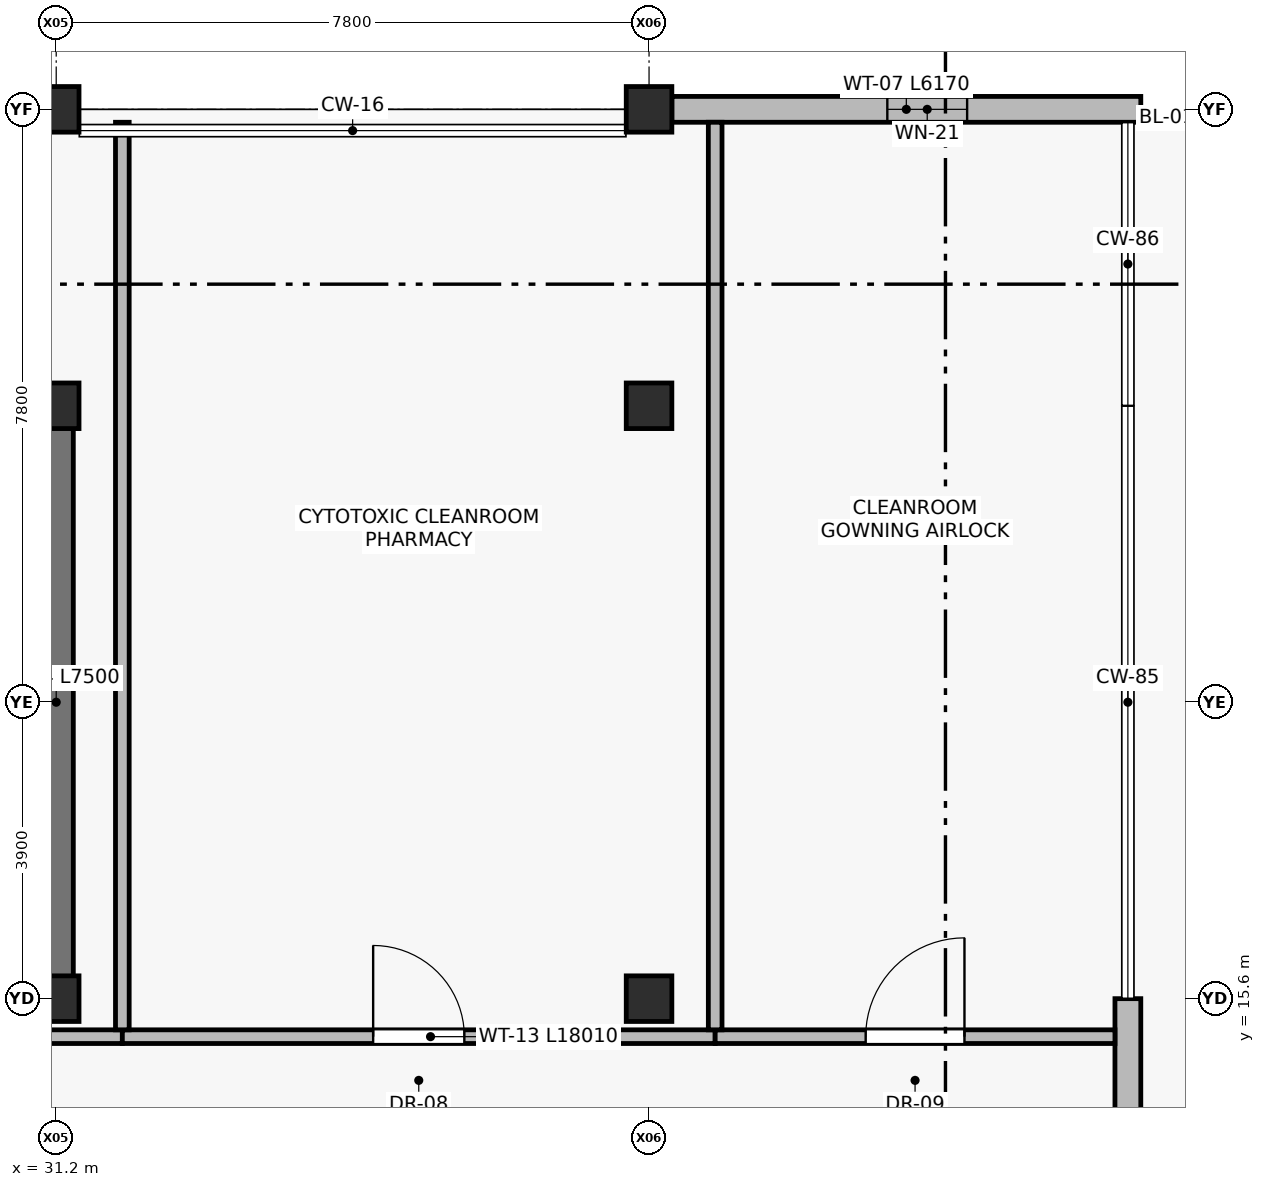
"""IFC4 building model, lengths in metres.
Left out: names, types, materials, properties, quantities, classifications, styles, units other than length and angle.
Written with IfcOpenShell. Run it as: python <this file> out.ifc"""

import sys

from ifc_helpers import new_model, si_unit, direction, frame, frame_2d, origin, origin_2d, place, context, subcontext, project, spatial, rectangle, extrude, element, fill, save


model = new_model("IFC4")
c1 = context("Model", 3, precision=1e-05, world=origin(), true_north=direction((0.0, 1.0)))
c2 = subcontext(c1, "Body", "Model", "MODEL_VIEW")
j1 = project(units=[si_unit("LENGTHUNIT", "METRE"), si_unit("PLANEANGLEUNIT", "RADIAN")], contexts=[c1])
p1 = place(None, origin())
s1 = spatial("IfcSite", under=j1, at=p1, CompositionType="ELEMENT")
p2 = place(p1, origin())
s2 = spatial("IfcBuilding", under=s1, at=p2, CompositionType="ELEMENT")
p3 = place(p2, frame((0.0, 0.0, 4.8)))
s3 = spatial("IfcBuildingStorey", under=s2, at=p3, CompositionType="ELEMENT", Elevation=4.8)
for number, where, z_axis, x_axis in (
    (1, (31.2, 15.6, 0.0), (0.0, 0.0, 1.0), (1.0, 0.0, 0.0)),
    (2, (31.2, 23.4, 0.0), (0.0, 0.0, 1.0), (1.0, 0.0, 0.0)),
    (3, (31.2, 27.3, 0.0), (0.0, 0.0, 1.0), (1.0, 0.0, 0.0)),
    (4, (39.0, 15.6, 0.0), (0.0, 0.0, 1.0), (1.0, 0.0, 0.0)),
    (5, (39.0, 23.4, 0.0), (0.0, 0.0, 1.0), (1.0, 0.0, 0.0)),
    (6, (39.0, 27.3, 0.0), (0.0, 0.0, 1.0), (1.0, 0.0, 0.0)),
):
    element("IfcColumn", number, at=place(p3, frame(where, z_axis=z_axis, x_axis=x_axis)), inside=s3, PredefinedType="COLUMN", context=c2, shape_type="SweptSolid", body=[
        extrude(rectangle(XDim=0.6, YDim=0.6, at=origin_2d()), origin(), (0.0, 0.0, 1.0), 4.8),
    ])
p4 = place(p3, frame((39.3, 27.3, 0.0), z_axis=(0.0, 0.0, 1.0), x_axis=(1.0, 0.0, 0.0)))
e7 = element("IfcWall", 7, at=p4, inside=s3, PredefinedType="STANDARD", context=c2, shape_type="SweptSolid", body=[
    extrude(rectangle(XDim=6.17, YDim=0.34, at=frame_2d((3.085, 0.0))), origin(), (0.0, 0.0, 1.0), 4.14),
])
p5 = place(p4, frame((2.835, 0.0, 0.9)))
e8 = element("IfcOpeningElement", 8, at=p5, cuts=e7, PredefinedType="OPENING", context=c2, shape_type="SweptSolid", body=[
    extrude(rectangle(XDim=1.05, YDim=1.65, at=frame_2d((0.525, 0.825))), frame((0.0, 0.18, 0.0), z_axis=(0.0, -1.0, 0.0), x_axis=(1.0, 0.0, 0.0)), (0.0, 0.0, 1.0), 0.36),
])
p6 = place(p3, frame((45.3, 15.6, 0.0), z_axis=(0.0, 0.0, 1.0), x_axis=(0.0, -1.0, 0.0)))
e9 = element("IfcWall", 9, at=p6, inside=s3, PredefinedType="STANDARD", context=c2, shape_type="SweptSolid", body=[
    extrude(rectangle(XDim=7.8, YDim=0.34, at=frame_2d((3.9, 0.0))), origin(), (0.0, 0.0, 1.0), 4.54),
])
p7 = place(p6, frame((1.475, 0.0, 0.0)))
e10 = element("IfcOpeningElement", 10, at=p7, cuts=e9, PredefinedType="OPENING", context=c2, shape_type="SweptSolid", body=[
    extrude(rectangle(XDim=1.25, YDim=2.2, at=frame_2d((0.625, 1.1))), frame((0.0, 0.18, 0.0), z_axis=(0.0, -1.0, 0.0), x_axis=(1.0, 0.0, 0.0)), (0.0, 0.0, 1.0), 0.36),
])
p8 = place(p3, frame((31.2, 15.75, 0.0), z_axis=(0.0, 0.0, 1.0), x_axis=(0.0, 1.0, 0.0)))
e11 = element("IfcWall", 11, at=p8, inside=s3, PredefinedType="SHEAR", context=c2, shape_type="SweptSolid", body=[
    extrude(rectangle(XDim=7.5, YDim=0.45, at=frame_2d((3.75, 0.0))), origin(), (0.0, 0.0, 1.0), 4.54),
])
p9 = place(p3, frame((27.12, 15.1, 0.0), z_axis=(0.0, 0.0, 1.0), x_axis=(1.0, 0.0, 0.0)))
e12 = element("IfcWall", 12, at=p9, inside=s3, PredefinedType="PARTITIONING", context=c2, shape_type="SweptSolid", body=[
    extrude(rectangle(XDim=4.95, YDim=0.18, at=frame_2d((2.475, 0.0))), origin(), (0.0, 0.0, 1.0), 4.54),
])
p10 = place(p9, frame((1.9, 0.0, 0.0)))
e13 = element("IfcOpeningElement", 13, at=p10, cuts=e12, PredefinedType="OPENING", context=c2, shape_type="SweptSolid", body=[
    extrude(rectangle(XDim=1.15, YDim=2.2, at=frame_2d((0.575, 1.1))), frame((0.0, 0.1, 0.0), z_axis=(0.0, -1.0, 0.0), x_axis=(1.0, 0.0, 0.0)), (0.0, 0.0, 1.0), 0.2),
])
p11 = place(p3, frame((32.07, 15.1, 0.0), z_axis=(0.0, 0.0, 1.0), x_axis=(1.0, 0.0, 0.0)))
e14 = element("IfcWall", 14, at=p11, inside=s3, PredefinedType="PARTITIONING", context=c2, shape_type="SweptSolid", body=[
    extrude(rectangle(XDim=7.8, YDim=0.18, at=frame_2d((3.9, 0.0))), origin(), (0.0, 0.0, 1.0), 4.54),
])
p12 = place(p11, frame((3.3, 0.0, 0.0)))
e15 = element("IfcOpeningElement", 15, at=p12, cuts=e14, PredefinedType="OPENING", context=c2, shape_type="SweptSolid", body=[
    extrude(rectangle(XDim=1.2, YDim=2.2, at=frame_2d((0.6, 1.1))), frame((0.0, 0.1, 0.0), z_axis=(0.0, -1.0, 0.0), x_axis=(1.0, 0.0, 0.0)), (0.0, 0.0, 1.0), 0.2),
])
p13 = place(p3, frame((39.87, 15.1, 0.0), z_axis=(0.0, 0.0, 1.0), x_axis=(1.0, 0.0, 0.0)))
e16 = element("IfcWall", 16, at=p13, inside=s3, PredefinedType="PARTITIONING", context=c2, shape_type="SweptSolid", body=[
    extrude(rectangle(XDim=5.26, YDim=0.18, at=frame_2d((2.63, 0.0))), origin(), (0.0, 0.0, 1.0), 4.54),
])
p14 = place(p13, frame((1.98, 0.0, 0.0)))
e17 = element("IfcOpeningElement", 17, at=p14, cuts=e16, PredefinedType="OPENING", context=c2, shape_type="SweptSolid", body=[
    extrude(rectangle(XDim=1.3, YDim=2.2, at=frame_2d((0.65, 1.1))), frame((0.0, 0.1, 0.0), z_axis=(0.0, -1.0, 0.0), x_axis=(1.0, 0.0, 0.0)), (0.0, 0.0, 1.0), 0.2),
])
for number, where, z_axis, x_axis in (
    (18, (32.07, 15.19, 0.0), (0.0, 0.0, 1.0), (0.0, 1.0, 0.0)),
    (19, (39.87, 15.19, 0.0), (0.0, 0.0, 1.0), (0.0, 1.0, 0.0)),
):
    element("IfcWall", number, at=place(p3, frame(where, z_axis=z_axis, x_axis=x_axis)), inside=s3, PredefinedType="PARTITIONING", context=c2, shape_type="SweptSolid", body=[
        extrude(rectangle(XDim=11.94, YDim=0.18, at=frame_2d((5.97, 0.0))), origin(), (0.0, 0.0, 1.0), 4.54),
    ])
p15 = place(p5, origin())
e20 = element("IfcWindow", 20, at=p15, inside=s3, PartitioningType="SINGLE_PANEL", PredefinedType="WINDOW", context=c2, shape_type="SweptSolid", body=[
    extrude(rectangle(XDim=1.05, YDim=1.65, at=frame_2d((0.525, 0.825))), frame((0.0, 0.03, 0.0), z_axis=(0.0, -1.0, 0.0), x_axis=(1.0, 0.0, 0.0)), (0.0, 0.0, 1.0), 0.06),
])
fill(e8, e20)
p16 = place(p12, origin())
e21 = element("IfcDoor", 21, at=p16, inside=s3, OperationType="SINGLE_SWING_LEFT", PredefinedType="DOOR", context=c2, shape_type="SweptSolid", body=[
    extrude(rectangle(XDim=1.2, YDim=2.2, at=frame_2d((0.6, 1.1))), frame((0.0, 0.025, 0.0), z_axis=(0.0, -1.0, 0.0), x_axis=(1.0, 0.0, 0.0)), (0.0, 0.0, 1.0), 0.05),
])
fill(e15, e21)
p17 = place(p14, origin())
e22 = element("IfcDoor", 22, at=p17, inside=s3, OperationType="SINGLE_SWING_RIGHT", PredefinedType="DOOR", context=c2, shape_type="SweptSolid", body=[
    extrude(rectangle(XDim=1.3, YDim=2.2, at=frame_2d((0.65, 1.1))), frame((0.0, 0.025, 0.0), z_axis=(0.0, -1.0, 0.0), x_axis=(1.0, 0.0, 0.0)), (0.0, 0.0, 1.0), 0.05),
])
fill(e17, e22)
save(model, sys.argv[1])
